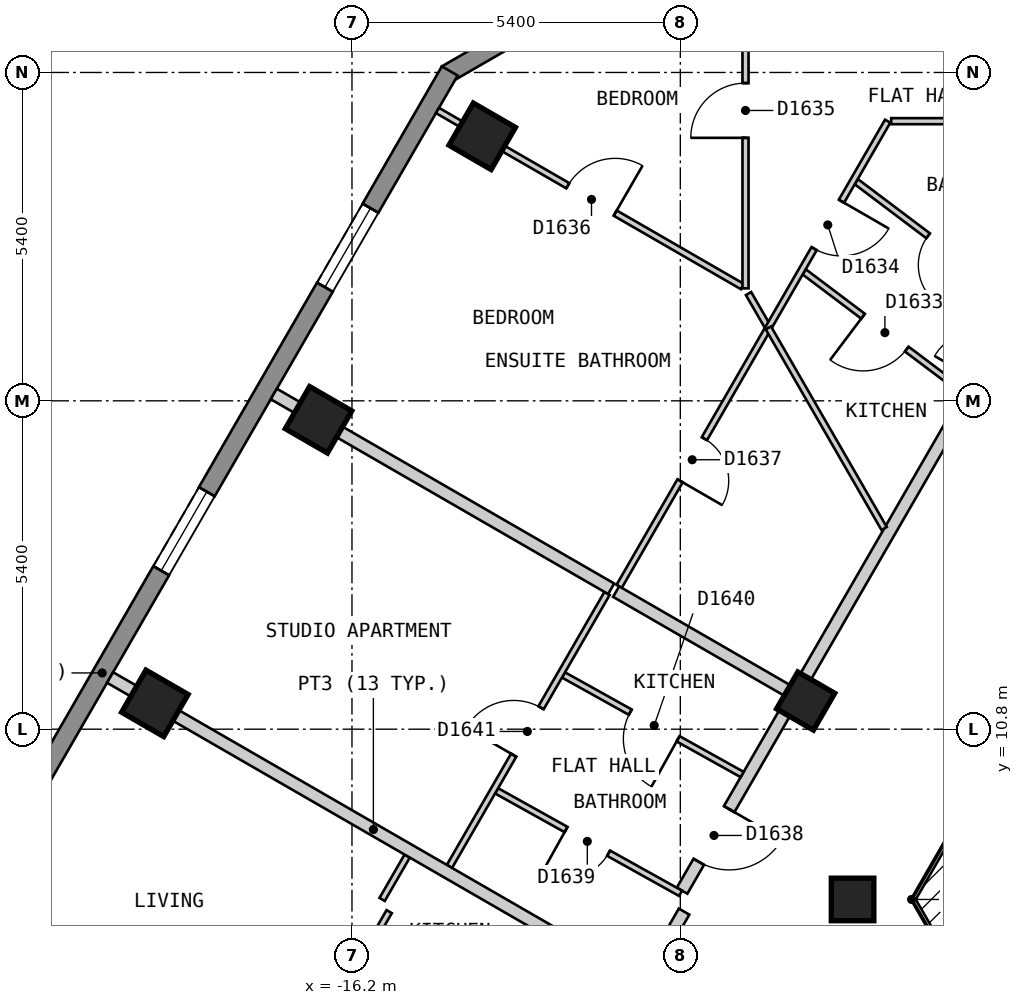
"""IFC4 building model, lengths in metres.
Left out: names, types, materials, properties, quantities, classifications, styles, units other than length and angle.
Written with IfcOpenShell. Run it as: python <this file> out.ifc"""

import sys

from ifc_helpers import new_model, si_unit, direction, frame, frame_2d, origin, origin_2d, place, context, subcontext, project, spatial, polyline, rectangle, outline, extrude, element, fill, save


model = new_model("IFC4")
c1 = context("Model", 3, precision=1e-05, world=origin(), true_north=direction((0.0, 1.0)))
c2 = subcontext(c1, "Body", "Model", "MODEL_VIEW")
j1 = project(units=[si_unit("LENGTHUNIT", "METRE"), si_unit("PLANEANGLEUNIT", "RADIAN")], contexts=[c1])
p1 = place(None, origin())
s1 = spatial("IfcSite", under=j1, at=p1, CompositionType="ELEMENT")
p2 = place(p1, origin())
s2 = spatial("IfcBuilding", under=s1, at=p2, CompositionType="ELEMENT")
p3 = place(p2, frame((0.0, 0.0, 169.2)))
s3 = spatial("IfcBuildingStorey", under=s2, at=p3, CompositionType="ELEMENT", Elevation=169.2)
for number, where, z_axis, x_axis in (
    (1, (-14.058, 20.55, 0.0), (0.0, 0.0, 1.0), (-0.5, -0.866, 0.0)),
    (2, (-16.75, 15.888, 0.0), (0.0, 0.0, 1.0), (-0.5, -0.866, 0.0)),
    (3, (-19.442, 11.225, 0.0), (0.0, 0.0, 1.0), (-0.5, -0.866, 0.0)),
):
    element("IfcColumn", number, at=place(p3, frame(where, z_axis=z_axis, x_axis=x_axis)), inside=s3, PredefinedType="COLUMN", context=c2, shape_type="SweptSolid", body=[
        extrude(rectangle(XDim=0.8, YDim=0.8, at=origin_2d()), origin(), (0.0, 0.0, 1.0), 3.0),
    ])
for number, where, z_axis, x_axis in (
    (4, (-8.739, 11.263, 0.0), (0.0, 0.0, 1.0), (-0.5, -0.866, 0.0)),
    (5, (-7.967, 8.0, 0.0), (0.0, 0.0, 1.0), (1.0, 0.0, 0.0)),
):
    element("IfcColumn", number, at=place(p3, frame(where, z_axis=z_axis, x_axis=x_axis)), inside=s3, PredefinedType="COLUMN", context=c2, shape_type="SweptSolid", body=[
        extrude(rectangle(XDim=0.7, YDim=0.7, at=origin_2d()), origin(), (0.0, 0.0, 1.0), 3.0),
    ])
p4 = place(p3, frame((-10.317, 24.07, 0.0), z_axis=(0.0, 0.0, 1.0), x_axis=(-0.866022959057, -0.500004234368, 0.0)))
e6 = element("IfcWall", 6, at=p4, inside=s3, PredefinedType="SOLIDWALL", context=c2, shape_type="SweptSolid", body=[
    extrude(outline(polyline([(0.0, -0.15), (5.0, -0.15), (4.92, 0.15), (0.08, 0.15), (0.0, -0.15)])), origin(), (0.0, 0.0, 1.0), 2.7),
])
p5 = place(p4, frame((0.65, 0.0, 0.15)))
e7 = element("IfcOpeningElement", 7, at=p5, cuts=e6, PredefinedType="OPENING", context=c2, shape_type="SweptSolid", body=[
    extrude(rectangle(XDim=1.2, YDim=2.1, at=frame_2d((0.6, 1.05))), frame((0.0, 0.16, 0.0), z_axis=(0.0, -1.0, 0.0), x_axis=(1.0, 0.0, 0.0)), (0.0, 0.0, 1.0), 0.32),
])
p6 = place(p3, frame((-14.592, 21.625, 0.0), z_axis=(0.0, 0.0, 1.0), x_axis=(-0.500010537973, -0.866019319597, 0.0)))
e8 = element("IfcWall", 8, at=p6, inside=s3, PredefinedType="SOLIDWALL", context=c2, shape_type="SweptSolid", body=[
    extrude(outline(polyline([(0.0, -0.15), (22.863, -0.15), (22.783, 0.15), (0.08, 0.15), (0.0, -0.15)])), origin(), (0.0, 0.0, 1.0), 2.7),
])
p7 = place(p6, frame((2.606, 0.0, 0.15)))
e9 = element("IfcOpeningElement", 9, at=p7, cuts=e8, PredefinedType="OPENING", context=c2, shape_type="SweptSolid", body=[
    extrude(rectangle(XDim=1.5, YDim=2.1, at=frame_2d((0.75, 1.05))), frame((0.0, 0.16, 0.0), z_axis=(0.0, -1.0, 0.0), x_axis=(1.0, 0.0, 0.0)), (0.0, 0.0, 1.0), 0.32),
])
p8 = place(p6, frame((7.99, 0.0, 0.15)))
e10 = element("IfcOpeningElement", 10, at=p8, cuts=e8, PredefinedType="OPENING", context=c2, shape_type="SweptSolid", body=[
    extrude(rectangle(XDim=1.5, YDim=2.1, at=frame_2d((0.75, 1.05))), frame((0.0, 0.16, 0.0), z_axis=(0.0, -1.0, 0.0), x_axis=(1.0, 0.0, 0.0)), (0.0, 0.0, 1.0), 0.32),
])
p9 = place(p6, frame((13.373, 0.0, 0.15)))
e11 = element("IfcOpeningElement", 11, at=p9, cuts=e8, PredefinedType="OPENING", context=c2, shape_type="SweptSolid", body=[
    extrude(rectangle(XDim=1.5, YDim=2.1, at=frame_2d((0.75, 1.05))), frame((0.0, 0.16, 0.0), z_axis=(0.0, -1.0, 0.0), x_axis=(1.0, 0.0, 0.0)), (0.0, 0.0, 1.0), 0.32),
])
p10 = place(p6, frame((18.758, 0.0, 0.15)))
e12 = element("IfcOpeningElement", 12, at=p10, cuts=e8, PredefinedType="OPENING", context=c2, shape_type="SweptSolid", body=[
    extrude(rectangle(XDim=1.5, YDim=2.1, at=frame_2d((0.75, 1.05))), frame((0.0, 0.16, 0.0), z_axis=(0.0, -1.0, 0.0), x_axis=(1.0, 0.0, 0.0)), (0.0, 0.0, 1.0), 0.32),
])
p11 = place(p3, frame((-15.53, -0.501, 0.0), z_axis=(0.0, 0.0, 1.0), x_axis=(0.499952498232, 0.866052827206, 0.0)))
e13 = element("IfcWall", 13, at=p11, inside=s3, PredefinedType="PARTITIONING", context=c2, shape_type="SweptSolid", body=[
    extrude(rectangle(XDim=9.585, YDim=0.2, at=frame_2d((4.792, 0.0))), origin(), (0.0, 0.0, 1.0), 2.7),
])
p12 = place(p11, frame((5.031, 0.0, 0.0)))
e14 = element("IfcOpeningElement", 14, at=p12, cuts=e13, PredefinedType="OPENING", context=c2, shape_type="SweptSolid", body=[
    extrude(rectangle(XDim=1.0, YDim=2.1, at=frame_2d((0.5, 1.05))), frame((0.0, 0.11, 0.0), z_axis=(0.0, -1.0, 0.0), x_axis=(1.0, 0.0, 0.0)), (0.0, 0.0, 1.0), 0.22),
])
p13 = place(p3, frame((-10.771, 8.144, 0.0), z_axis=(0.0, 0.0, 1.0), x_axis=(0.500008507724, 0.866020491792, 0.0)))
e15 = element("IfcWall", 15, at=p13, inside=s3, PredefinedType="PARTITIONING", context=c2, shape_type="SweptSolid", body=[
    extrude(rectangle(XDim=10.688, YDim=0.2, at=frame_2d((5.344, 0.0))), origin(), (0.0, 0.0, 1.0), 2.7),
])
p14 = place(p13, frame((9.692, 0.0, 0.0)))
e16 = element("IfcOpeningElement", 16, at=p14, cuts=e15, PredefinedType="OPENING", context=c2, shape_type="SweptSolid", body=[
    extrude(rectangle(XDim=0.8, YDim=2.1, at=frame_2d((0.4, 1.05))), frame((0.0, 0.11, 0.0), z_axis=(0.0, -1.0, 0.0), x_axis=(1.0, 0.0, 0.0)), (0.0, 0.0, 1.0), 0.22),
])
p15 = place(p13, frame((0.549, 0.0, 0.0)))
e17 = element("IfcOpeningElement", 17, at=p15, cuts=e15, PredefinedType="OPENING", context=c2, shape_type="SweptSolid", body=[
    extrude(rectangle(XDim=1.0, YDim=2.1, at=frame_2d((0.5, 1.05))), frame((0.0, 0.11, 0.0), z_axis=(0.0, -1.0, 0.0), x_axis=(1.0, 0.0, 0.0)), (0.0, 0.0, 1.0), 0.22),
])
p16 = place(p3, frame((-9.678, 17.964, 0.0), z_axis=(0.0, 0.0, 1.0), x_axis=(0.500208928872, -0.865904745036, 0.0)))
e18 = element("IfcWall", 18, at=p16, inside=s3, PredefinedType="PARTITIONING", context=c2, shape_type="SweptSolid", body=[
    extrude(rectangle(XDim=0.652, YDim=0.1, at=frame_2d((0.326, 0.0))), origin(), (0.0, 0.0, 1.0), 2.7),
])
p17 = place(p3, frame((-12.721, 11.692, 0.0), z_axis=(0.0, 0.0, 1.0), x_axis=(0.873557394398, -0.486721150859, 0.0)))
e19 = element("IfcWall", 19, at=p17, inside=s3, PredefinedType="PARTITIONING", context=c2, shape_type="SweptSolid", body=[
    extrude(rectangle(XDim=3.363, YDim=0.1, at=frame_2d((1.682, 0.0))), origin(), (0.0, 0.0, 1.0), 2.7),
])
p18 = place(p17, frame((1.257, 0.0, 0.0)))
e20 = element("IfcOpeningElement", 20, at=p18, cuts=e19, PredefinedType="OPENING", context=c2, shape_type="SweptSolid", body=[
    extrude(rectangle(XDim=0.9, YDim=2.1, at=frame_2d((0.45, 1.05))), frame((0.0, 0.06, 0.0), z_axis=(0.0, -1.0, 0.0), x_axis=(1.0, 0.0, 0.0)), (0.0, 0.0, 1.0), 0.12),
])
p19 = place(p3, frame((-13.821, 9.786, 0.0), z_axis=(0.0, 0.0, 1.0), x_axis=(0.873644620966, -0.486564565353, 0.0)))
e21 = element("IfcWall", 21, at=p19, inside=s3, PredefinedType="PARTITIONING", context=c2, shape_type="SweptSolid", body=[
    extrude(rectangle(XDim=3.463, YDim=0.1, at=frame_2d((1.731, 0.0))), origin(), (0.0, 0.0, 1.0), 2.7),
])
p20 = place(p19, frame((1.307, 0.0, 0.0)))
e22 = element("IfcOpeningElement", 22, at=p20, cuts=e21, PredefinedType="OPENING", context=c2, shape_type="SweptSolid", body=[
    extrude(rectangle(XDim=0.8, YDim=2.1, at=frame_2d((0.4, 1.05))), frame((0.0, 0.06, 0.0), z_axis=(0.0, -1.0, 0.0), x_axis=(1.0, 0.0, 0.0)), (0.0, 0.0, 1.0), 0.12),
])
p21 = place(p3, frame((-14.794, 20.975, 0.0), z_axis=(0.0, 0.0, 1.0), x_axis=(0.866019221245, -0.500010708319, 0.0)))
e23 = element("IfcWall", 23, at=p21, inside=s3, PredefinedType="PARTITIONING", context=c2, shape_type="SweptSolid", body=[
    extrude(rectangle(XDim=5.792, YDim=0.1, at=frame_2d((2.896, 0.0))), origin(), (0.0, 0.0, 1.0), 2.7),
])
p22 = place(p21, frame((2.475, 0.0, 0.0)))
e24 = element("IfcOpeningElement", 24, at=p22, cuts=e23, PredefinedType="OPENING", context=c2, shape_type="SweptSolid", body=[
    extrude(rectangle(XDim=0.9, YDim=2.1, at=frame_2d((0.45, 1.05))), frame((0.0, 0.06, 0.0), z_axis=(0.0, -1.0, 0.0), x_axis=(1.0, 0.0, 0.0)), (0.0, 0.0, 1.0), 0.12),
])
p23 = place(p3, frame((-8.763, 18.321, 0.0), z_axis=(0.0, 0.0, 1.0), x_axis=(0.798861914713, -0.601514456369, 0.0)))
e25 = element("IfcWall", 25, at=p23, inside=s3, PredefinedType="PARTITIONING", context=c2, shape_type="SweptSolid", body=[
    extrude(rectangle(XDim=3.273, YDim=0.1, at=frame_2d((1.637, 0.0))), origin(), (0.0, 0.0, 1.0), 2.7),
])
p24 = place(p23, frame((1.212, 0.0, 0.0)))
e26 = element("IfcOpeningElement", 26, at=p24, cuts=e25, PredefinedType="OPENING", context=c2, shape_type="SweptSolid", body=[
    extrude(rectangle(XDim=0.9, YDim=2.1, at=frame_2d((0.45, 1.05))), frame((0.0, 0.06, 0.0), z_axis=(0.0, -1.0, 0.0), x_axis=(1.0, 0.0, 0.0)), (0.0, 0.0, 1.0), 0.12),
])
p25 = place(p3, frame((-7.906, 19.804, 0.0), z_axis=(0.0, 0.0, 1.0), x_axis=(0.798741470056, -0.60167438371, 0.0)))
e27 = element("IfcWall", 27, at=p25, inside=s3, PredefinedType="PARTITIONING", context=c2, shape_type="SweptSolid", body=[
    extrude(rectangle(XDim=3.683, YDim=0.1, at=frame_2d((1.842, 0.0))), origin(), (0.0, 0.0, 1.0), 2.7),
])
p26 = place(p25, frame((1.479, 0.0, 0.0)))
e28 = element("IfcOpeningElement", 28, at=p26, cuts=e27, PredefinedType="OPENING", context=c2, shape_type="SweptSolid", body=[
    extrude(rectangle(XDim=0.8, YDim=2.1, at=frame_2d((0.4, 1.05))), frame((0.0, 0.06, 0.0), z_axis=(0.0, -1.0, 0.0), x_axis=(1.0, 0.0, 0.0)), (0.0, 0.0, 1.0), 0.12),
])
p27 = place(p3, frame((-7.332, 20.799, 0.0), z_axis=(0.0, 0.0, 1.0), x_axis=(1.0, 0.0, 0.0)))
e29 = element("IfcWall", 29, at=p27, inside=s3, PredefinedType="PARTITIONING", context=c2, shape_type="SweptSolid", body=[
    extrude(rectangle(XDim=2.468, YDim=0.1, at=frame_2d((1.234, 0.0))), origin(), (0.0, 0.0, 1.0), 2.7),
])
p28 = place(p3, frame((-11.806, 13.149, 0.0), z_axis=(0.0, 0.0, 1.0), x_axis=(0.499932199895, 0.866064544655, 0.0)))
e30 = element("IfcWall", 30, at=p28, inside=s3, PredefinedType="PARTITIONING", context=c2, shape_type="SweptSolid", body=[
    extrude(rectangle(XDim=8.833, YDim=0.1, at=frame_2d((4.417, 0.0))), origin(), (0.0, 0.0, 1.0), 2.7),
])
p29 = place(p28, frame((6.413, 0.0, 0.0)))
e31 = element("IfcOpeningElement", 31, at=p29, cuts=e30, PredefinedType="OPENING", context=c2, shape_type="SweptSolid", body=[
    extrude(rectangle(XDim=0.9, YDim=2.1, at=frame_2d((0.45, 1.05))), frame((0.0, 0.06, 0.0), z_axis=(0.0, -1.0, 0.0), x_axis=(1.0, 0.0, 0.0)), (0.0, 0.0, 1.0), 0.12),
])
p30 = place(p28, frame((2.004, 0.0, 0.0)))
e32 = element("IfcOpeningElement", 32, at=p30, cuts=e30, PredefinedType="OPENING", context=c2, shape_type="SweptSolid", body=[
    extrude(rectangle(XDim=0.8, YDim=2.1, at=frame_2d((0.4, 1.05))), frame((0.0, 0.06, 0.0), z_axis=(0.0, -1.0, 0.0), x_axis=(1.0, 0.0, 0.0)), (0.0, 0.0, 1.0), 0.12),
])
p31 = place(p3, frame((-14.597, 8.543, 0.0), z_axis=(0.0, 0.0, 1.0), x_axis=(0.499962957901, 0.866046788994, 0.0)))
e33 = element("IfcWall", 33, at=p31, inside=s3, PredefinedType="PARTITIONING", context=c2, shape_type="SweptSolid", body=[
    extrude(rectangle(XDim=5.185, YDim=0.1, at=frame_2d((2.592, 0.0))), origin(), (0.0, 0.0, 1.0), 2.7),
])
p32 = place(p31, frame((2.113, 0.0, 0.0)))
e34 = element("IfcOpeningElement", 34, at=p32, cuts=e33, PredefinedType="OPENING", context=c2, shape_type="SweptSolid", body=[
    extrude(rectangle(XDim=0.9, YDim=2.1, at=frame_2d((0.45, 1.05))), frame((0.0, 0.06, 0.0), z_axis=(0.0, -1.0, 0.0), x_axis=(1.0, 0.0, 0.0)), (0.0, 0.0, 1.0), 0.12),
])
p33 = place(p3, frame((-15.704, 8.0, 0.0), z_axis=(0.0, 0.0, 1.0), x_axis=(0.499833531678, 0.866121492985, 0.0)))
e35 = element("IfcWall", 35, at=p33, inside=s3, PredefinedType="PARTITIONING", context=c2, shape_type="SweptSolid", body=[
    extrude(rectangle(XDim=0.824, YDim=0.1, at=frame_2d((0.412, 0.0))), origin(), (0.0, 0.0, 1.0), 2.7),
])
p34 = place(p3, frame((-9.728, 18.05, 0.0), z_axis=(0.0, 0.0, 1.0), x_axis=(0.0, 1.0, 0.0)))
e36 = element("IfcWall", 36, at=p34, inside=s3, PredefinedType="PARTITIONING", context=c2, shape_type="SweptSolid", body=[
    extrude(rectangle(XDim=5.85, YDim=0.1, at=frame_2d((2.925, 0.0))), origin(), (0.0, 0.0, 1.0), 2.7),
])
p35 = place(p34, frame((2.475, 0.0, 0.0)))
e37 = element("IfcOpeningElement", 37, at=p35, cuts=e36, PredefinedType="OPENING", context=c2, shape_type="SweptSolid", body=[
    extrude(rectangle(XDim=0.9, YDim=2.1, at=frame_2d((0.45, 1.05))), frame((0.0, 0.06, 0.0), z_axis=(0.0, -1.0, 0.0), x_axis=(1.0, 0.0, 0.0)), (0.0, 0.0, 1.0), 0.12),
])
p36 = place(p3, frame((-20.178, 11.65, 0.0), z_axis=(0.0, 0.0, 1.0), x_axis=(0.866016855193, -0.500014806302, 0.0)))
e38 = element("IfcWall", 38, at=p36, inside=s3, PredefinedType="PARTITIONING", context=c2, shape_type="SweptSolid", body=[
    extrude(rectangle(XDim=10.0, YDim=0.2, at=frame_2d((5.0, 0.0))), origin(), (0.0, 0.0, 1.0), 2.7),
])
p37 = place(p3, frame((-17.486, 16.313, 0.0), z_axis=(0.0, 0.0, 1.0), x_axis=(0.866002210665, -0.500040169509, 0.0)))
e39 = element("IfcWall", 39, at=p37, inside=s3, PredefinedType="PARTITIONING", context=c2, shape_type="SweptSolid", body=[
    extrude(rectangle(XDim=6.408, YDim=0.2, at=frame_2d((3.204, 0.0))), origin(), (0.0, 0.0, 1.0), 2.7),
])
p38 = place(p3, frame((-11.856, 13.063, 0.0), z_axis=(0.0, 0.0, 1.0), x_axis=(0.865966208357, -0.500102515474, 0.0)))
e40 = element("IfcWall", 40, at=p38, inside=s3, PredefinedType="PARTITIONING", context=c2, shape_type="SweptSolid", body=[
    extrude(rectangle(XDim=3.299, YDim=0.2, at=frame_2d((1.649, 0.0))), origin(), (0.0, 0.0, 1.0), 2.7),
])
p39 = place(p3, frame((-9.352, 17.4, 0.0), z_axis=(0.0, 0.0, 1.0), x_axis=(0.499785326313, -0.866149310225, 0.0)))
e41 = element("IfcWall", 41, at=p39, inside=s3, PredefinedType="PARTITIONING", context=c2, shape_type="SweptSolid", body=[
    extrude(rectangle(XDim=3.81, YDim=0.1, at=frame_2d((1.905, 0.0))), origin(), (0.0, 0.0, 1.0), 2.7),
])
p40 = place(p3, frame((-17.761, 4.037, 0.0), z_axis=(0.0, 0.0, 1.0), x_axis=(0.50009692756, 0.865969435399, 0.0)))
e42 = element("IfcWall", 42, at=p40, inside=s3, PredefinedType="PARTITIONING", context=c2, shape_type="SweptSolid", body=[
    extrude(rectangle(XDim=4.345, YDim=0.1, at=frame_2d((2.173, 0.0))), origin(), (0.0, 0.0, 1.0), 2.7),
])
p41 = place(p40, frame((2.22, 0.0, 0.0)))
e43 = element("IfcOpeningElement", 43, at=p41, cuts=e42, PredefinedType="OPENING", context=c2, shape_type="SweptSolid", body=[
    extrude(rectangle(XDim=0.9, YDim=2.1, at=frame_2d((0.45, 1.05))), frame((0.0, 0.06, 0.0), z_axis=(0.0, -1.0, 0.0), x_axis=(1.0, 0.0, 0.0)), (0.0, 0.0, 1.0), 0.12),
])
p42 = place(p7, origin())
e44 = element("IfcWindow", 44, at=p42, inside=s3, PartitioningType="SINGLE_PANEL", PredefinedType="WINDOW", context=c2, shape_type="SweptSolid", body=[
    extrude(rectangle(XDim=1.5, YDim=2.1, at=frame_2d((0.75, 1.05))), frame((0.0, 0.03, 0.0), z_axis=(0.0, -1.0, 0.0), x_axis=(1.0, 0.0, 0.0)), (0.0, 0.0, 1.0), 0.06),
])
fill(e9, e44)
p43 = place(p8, origin())
e45 = element("IfcWindow", 45, at=p43, inside=s3, PartitioningType="SINGLE_PANEL", PredefinedType="WINDOW", context=c2, shape_type="SweptSolid", body=[
    extrude(rectangle(XDim=1.5, YDim=2.1, at=frame_2d((0.75, 1.05))), frame((0.0, 0.03, 0.0), z_axis=(0.0, -1.0, 0.0), x_axis=(1.0, 0.0, 0.0)), (0.0, 0.0, 1.0), 0.06),
])
fill(e10, e45)
p44 = place(p26, origin())
e46 = element("IfcDoor", 46, at=p44, inside=s3, OperationType="SINGLE_SWING_RIGHT", PredefinedType="DOOR", context=c2, shape_type="SweptSolid", body=[
    extrude(rectangle(XDim=0.8, YDim=2.1, at=frame_2d((0.4, 1.05))), frame((0.0, 0.025, 0.0), z_axis=(0.0, -1.0, 0.0), x_axis=(1.0, 0.0, 0.0)), (0.0, 0.0, 1.0), 0.05),
])
fill(e28, e46)
p45 = place(p24, origin())
e47 = element("IfcDoor", 47, at=p45, inside=s3, OperationType="SINGLE_SWING_LEFT", PredefinedType="DOOR", context=c2, shape_type="SweptSolid", body=[
    extrude(rectangle(XDim=0.9, YDim=2.1, at=frame_2d((0.45, 1.05))), frame((0.0, 0.025, 0.0), z_axis=(0.0, -1.0, 0.0), x_axis=(1.0, 0.0, 0.0)), (0.0, 0.0, 1.0), 0.05),
])
fill(e26, e47)
p46 = place(p29, origin())
e48 = element("IfcDoor", 48, at=p46, inside=s3, OperationType="SINGLE_SWING_RIGHT", PredefinedType="DOOR", context=c2, shape_type="SweptSolid", body=[
    extrude(rectangle(XDim=0.9, YDim=2.1, at=frame_2d((0.45, 1.05))), frame((0.0, 0.025, 0.0), z_axis=(0.0, -1.0, 0.0), x_axis=(1.0, 0.0, 0.0)), (0.0, 0.0, 1.0), 0.05),
])
fill(e31, e48)
p47 = place(p35, origin())
e49 = element("IfcDoor", 49, at=p47, inside=s3, OperationType="SINGLE_SWING_LEFT", PredefinedType="DOOR", context=c2, shape_type="SweptSolid", body=[
    extrude(rectangle(XDim=0.9, YDim=2.1, at=frame_2d((0.45, 1.05))), frame((0.0, 0.025, 0.0), z_axis=(0.0, -1.0, 0.0), x_axis=(1.0, 0.0, 0.0)), (0.0, 0.0, 1.0), 0.05),
])
fill(e37, e49)
p48 = place(p22, origin())
e50 = element("IfcDoor", 50, at=p48, inside=s3, OperationType="SINGLE_SWING_RIGHT", PredefinedType="DOOR", context=c2, shape_type="SweptSolid", body=[
    extrude(rectangle(XDim=0.9, YDim=2.1, at=frame_2d((0.45, 1.05))), frame((0.0, 0.025, 0.0), z_axis=(0.0, -1.0, 0.0), x_axis=(1.0, 0.0, 0.0)), (0.0, 0.0, 1.0), 0.05),
])
fill(e24, e50)
p49 = place(p30, origin())
e51 = element("IfcDoor", 51, at=p49, inside=s3, OperationType="SINGLE_SWING_LEFT", PredefinedType="DOOR", context=c2, shape_type="SweptSolid", body=[
    extrude(rectangle(XDim=0.8, YDim=2.1, at=frame_2d((0.4, 1.05))), frame((0.0, 0.025, 0.0), z_axis=(0.0, -1.0, 0.0), x_axis=(1.0, 0.0, 0.0)), (0.0, 0.0, 1.0), 0.05),
])
fill(e32, e51)
p50 = place(p15, origin())
e52 = element("IfcDoor", 52, at=p50, inside=s3, OperationType="SINGLE_SWING_RIGHT", PredefinedType="DOOR", context=c2, shape_type="SweptSolid", body=[
    extrude(rectangle(XDim=1.0, YDim=2.1, at=frame_2d((0.5, 1.05))), frame((0.0, 0.025, 0.0), z_axis=(0.0, -1.0, 0.0), x_axis=(1.0, 0.0, 0.0)), (0.0, 0.0, 1.0), 0.05),
])
fill(e17, e52)
p51 = place(p20, origin())
e53 = element("IfcDoor", 53, at=p51, inside=s3, OperationType="SINGLE_SWING_LEFT", PredefinedType="DOOR", context=c2, shape_type="SweptSolid", body=[
    extrude(rectangle(XDim=0.8, YDim=2.1, at=frame_2d((0.4, 1.05))), frame((0.0, 0.025, 0.0), z_axis=(0.0, -1.0, 0.0), x_axis=(1.0, 0.0, 0.0)), (0.0, 0.0, 1.0), 0.05),
])
fill(e22, e53)
p52 = place(p18, origin())
e54 = element("IfcDoor", 54, at=p52, inside=s3, OperationType="SINGLE_SWING_RIGHT", PredefinedType="DOOR", context=c2, shape_type="SweptSolid", body=[
    extrude(rectangle(XDim=0.9, YDim=2.1, at=frame_2d((0.45, 1.05))), frame((0.0, 0.025, 0.0), z_axis=(0.0, -1.0, 0.0), x_axis=(1.0, 0.0, 0.0)), (0.0, 0.0, 1.0), 0.05),
])
fill(e20, e54)
p53 = place(p32, origin())
e55 = element("IfcDoor", 55, at=p53, inside=s3, OperationType="SINGLE_SWING_LEFT", PredefinedType="DOOR", context=c2, shape_type="SweptSolid", body=[
    extrude(rectangle(XDim=0.9, YDim=2.1, at=frame_2d((0.45, 1.05))), frame((0.0, 0.025, 0.0), z_axis=(0.0, -1.0, 0.0), x_axis=(1.0, 0.0, 0.0)), (0.0, 0.0, 1.0), 0.05),
])
fill(e34, e55)
save(model, sys.argv[1])
